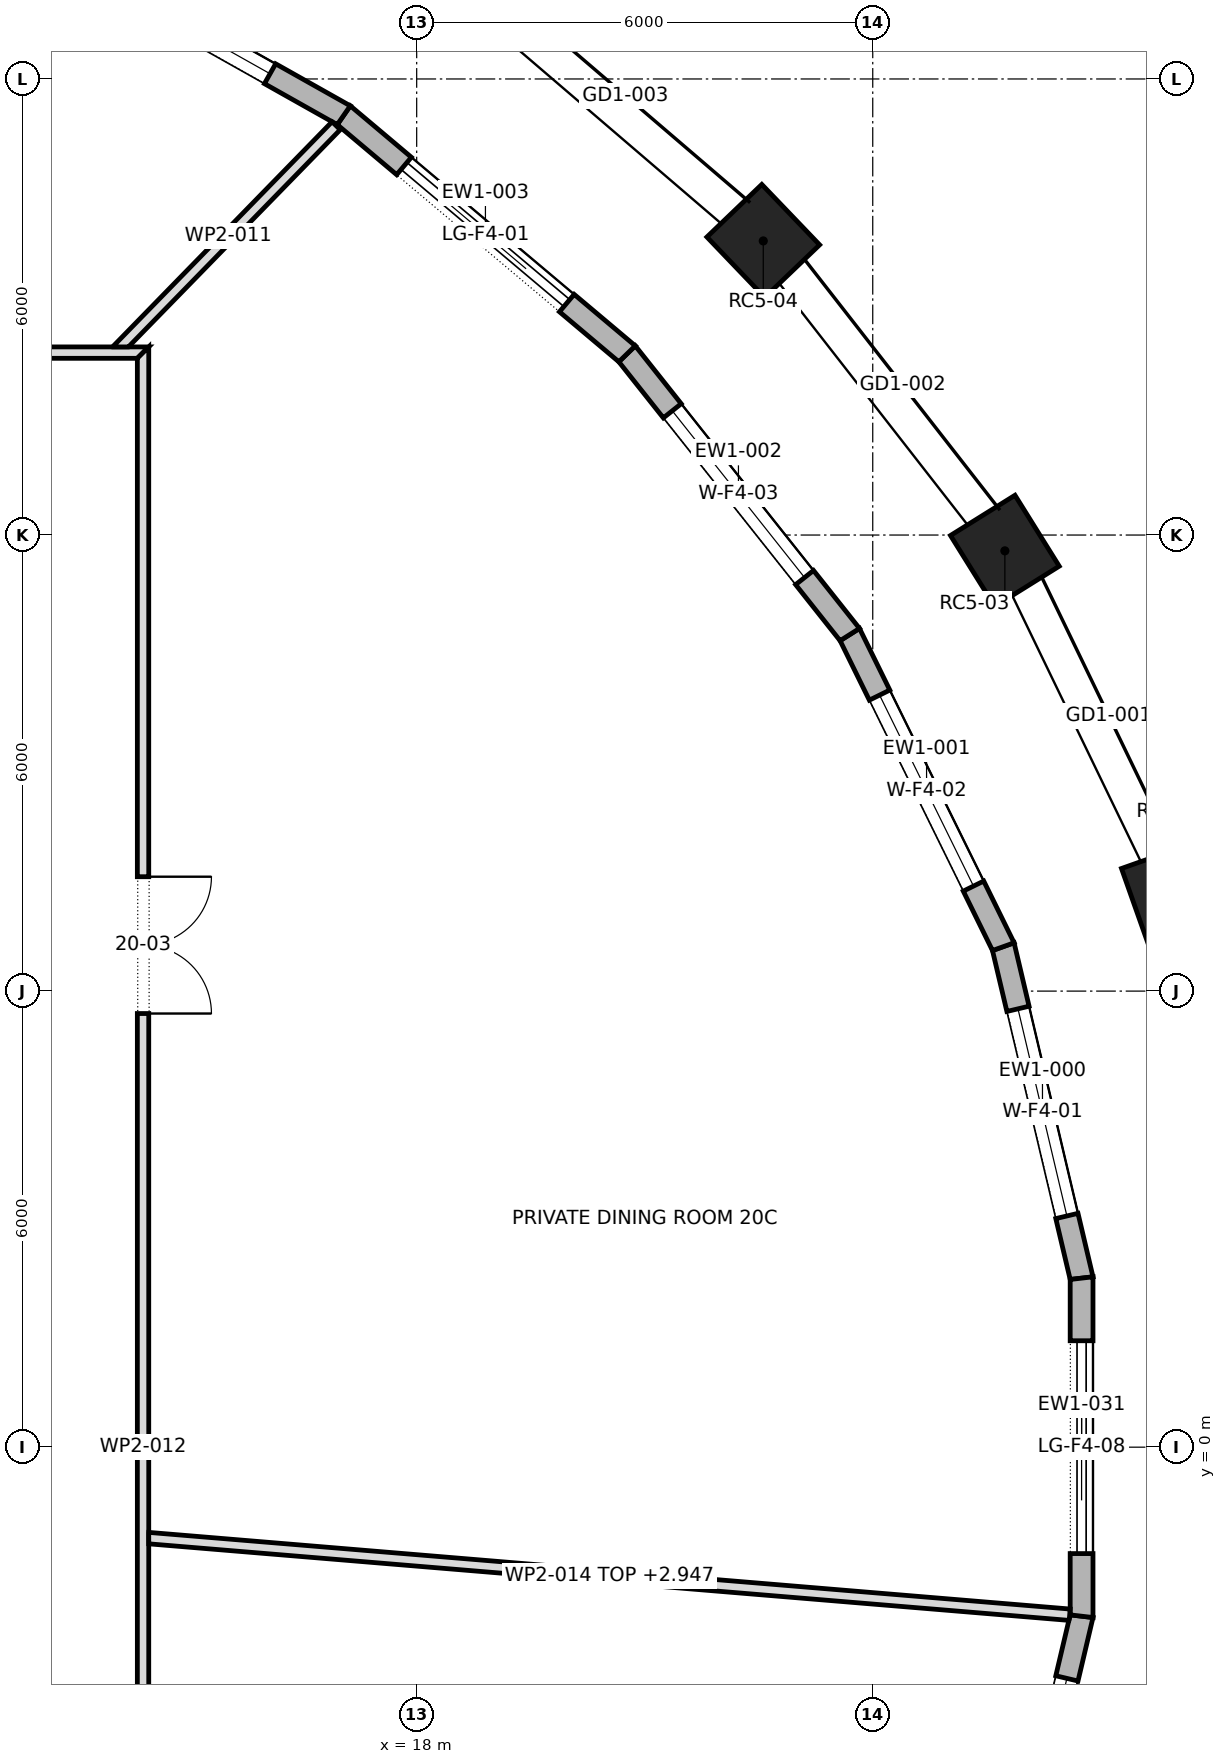
"""IFC4 building model, lengths in metres.
Left out: names, types, materials, properties, quantities, classifications, styles, units other than length and angle.
Written with IfcOpenShell. Run it as: python <this file> out.ifc"""

import sys

from ifc_helpers import new_model, si_unit, direction, frame, frame_2d, origin, origin_2d, place, context, subcontext, project, spatial, polyline, rectangle, outline, extrude, element, fill, save


model = new_model("IFC4")
c1 = context("Model", 3, precision=1e-05, world=origin(), true_north=direction((0.0, 1.0)))
c2 = subcontext(c1, "Body", "Model", "MODEL_VIEW")
j1 = project(units=[si_unit("LENGTHUNIT", "METRE"), si_unit("PLANEANGLEUNIT", "RADIAN")], contexts=[c1])
p1 = place(None, origin())
s1 = spatial("IfcSite", under=j1, at=p1, CompositionType="ELEMENT")
p2 = place(p1, origin())
s2 = spatial("IfcBuilding", under=s1, at=p2, CompositionType="ELEMENT")
p3 = place(p2, frame((0.0, 0.0, 288.3)))
s3 = spatial("IfcBuildingStorey", under=s2, at=p3, CompositionType="ELEMENT", Elevation=288.3)
for number, where, z_axis, x_axis in (
    (1, (27.927, 7.261, 0.0), (0.0, 0.0, 1.0), (-0.334, 0.943, 0.0)),
    (2, (25.738, 11.792, 0.0), (0.0, 0.0, 1.0), (-0.529, 0.849, 0.0)),
    (3, (22.56, 15.869, 0.0), (0.0, 0.0, 1.0), (-0.692, 0.722, 0.0)),
):
    element("IfcColumn", number, at=place(p3, frame(where, z_axis=z_axis, x_axis=x_axis)), inside=s3, PredefinedType="COLUMN", context=c2, shape_type="SweptSolid", body=[
        extrude(rectangle(XDim=1.1, YDim=1.0, at=origin_2d()), origin(), (0.0, 0.0, 1.0), 4.0),
    ])
p4 = place(p3, frame((26.748, 2.224, 0.0), z_axis=(0.0, 0.0, 1.0), x_axis=(-0.229862207503, 0.973223183839, 0.0)))
e4 = element("IfcWall", 4, at=p4, inside=s3, PredefinedType="STANDARD", context=c2, shape_type="SweptSolid", body=[
    extrude(outline(polyline([(-0.018, -0.15), (4.498, -0.15), (4.464, 0.15), (0.018, 0.15), (-0.018, -0.15)])), origin(), (0.0, 0.0, 1.0), 3.7),
])
p5 = place(p4, frame((0.841, 0.0, 0.6)))
e5 = element("IfcOpeningElement", 5, at=p5, cuts=e4, PredefinedType="OPENING", context=c2, shape_type="SweptSolid", body=[
    extrude(rectangle(XDim=2.8, YDim=2.65, at=frame_2d((1.4, 1.325))), frame((0.0, 0.162, 0.0), z_axis=(0.0, -1.0, 0.0), x_axis=(1.0, 0.0, 0.0)), (0.0, 0.0, 1.0), 0.324),
])
p6 = place(p3, frame((25.718, 6.585, 0.0), z_axis=(0.0, 0.0, 1.0), x_axis=(-0.441335149795, 0.897342345794, 0.0)))
e6 = element("IfcWall", 6, at=p6, inside=s3, PredefinedType="STANDARD", context=c2, shape_type="SweptSolid", body=[
    extrude(outline(polyline([(-0.017, -0.15), (4.592, -0.15), (4.56, 0.15), (0.017, 0.15), (-0.017, -0.15)])), origin(), (0.0, 0.0, 1.0), 3.7),
])
p7 = place(p6, frame((0.888, 0.0, 0.6)))
e7 = element("IfcOpeningElement", 7, at=p7, cuts=e6, PredefinedType="OPENING", context=c2, shape_type="SweptSolid", body=[
    extrude(rectangle(XDim=2.8, YDim=2.65, at=frame_2d((1.4, 1.325))), frame((0.0, 0.162, 0.0), z_axis=(0.0, -1.0, 0.0), x_axis=(1.0, 0.0, 0.0)), (0.0, 0.0, 1.0), 0.324),
])
p8 = place(p3, frame((23.698, 10.691, 0.0), z_axis=(0.0, 0.0, 1.0), x_axis=(-0.621544881236, 0.783378555112, 0.0)))
e8 = element("IfcWall", 8, at=p8, inside=s3, PredefinedType="STANDARD", context=c2, shape_type="SweptSolid", body=[
    extrude(outline(polyline([(-0.016, -0.15), (4.729, -0.15), (4.699, 0.15), (0.016, 0.15), (-0.016, -0.15)])), origin(), (0.0, 0.0, 1.0), 3.7),
])
p9 = place(p8, frame((0.957, 0.0, 0.6)))
e9 = element("IfcOpeningElement", 9, at=p9, cuts=e8, PredefinedType="OPENING", context=c2, shape_type="SweptSolid", body=[
    extrude(rectangle(XDim=2.8, YDim=2.65, at=frame_2d((1.4, 1.325))), frame((0.0, 0.162, 0.0), z_axis=(0.0, -1.0, 0.0), x_axis=(1.0, 0.0, 0.0)), (0.0, 0.0, 1.0), 0.324),
])
p10 = place(p3, frame((20.768, 14.384, 0.0), z_axis=(0.0, 0.0, 1.0), x_axis=(-0.764876116592, 0.644177402792, 0.0)))
e10 = element("IfcWall", 10, at=p10, inside=s3, PredefinedType="STANDARD", context=c2, shape_type="SweptSolid", body=[
    extrude(outline(polyline([(-0.015, -0.15), (4.887, -0.15), (4.859, 0.15), (0.015, 0.15), (-0.015, -0.15)])), origin(), (0.0, 0.0, 1.0), 3.7),
])
p11 = place(p10, frame((1.036, 0.0, 0.0)))
e11 = element("IfcOpeningElement", 11, at=p11, cuts=e10, PredefinedType="OPENING", context=c2, shape_type="SweptSolid", body=[
    extrude(rectangle(XDim=2.8, YDim=3.25, at=frame_2d((1.4, 1.625))), frame((0.0, 0.162, 0.0), z_axis=(0.0, -1.0, 0.0), x_axis=(1.0, 0.0, 0.0)), (0.0, 0.0, 1.0), 0.324),
])
p12 = place(p3, frame((17.041, 17.523, 0.0), z_axis=(0.0, 0.0, 1.0), x_axis=(-0.871488606878, 0.490415750239, 0.0)))
e12 = element("IfcWall", 12, at=p12, inside=s3, PredefinedType="STANDARD", context=c2, shape_type="SweptSolid", body=[
    extrude(outline(polyline([(-0.014, -0.15), (5.039, -0.15), (5.013, 0.15), (0.014, 0.15), (-0.014, -0.15)])), origin(), (0.0, 0.0, 1.0), 3.7),
])
p13 = place(p12, frame((1.113, 0.0, 0.6)))
e13 = element("IfcOpeningElement", 13, at=p13, cuts=e12, PredefinedType="OPENING", context=c2, shape_type="SweptSolid", body=[
    extrude(rectangle(XDim=2.8, YDim=2.65, at=frame_2d((1.4, 1.325))), frame((0.0, 0.162, 0.0), z_axis=(0.0, -1.0, 0.0), x_axis=(1.0, 0.0, 0.0)), (0.0, 0.0, 1.0), 0.324),
])
p14 = place(p3, frame((25.718, -6.585, 0.0), z_axis=(0.0, 0.0, 1.0), x_axis=(0.229862207503, 0.973223183839, 0.0)))
e14 = element("IfcWall", 14, at=p14, inside=s3, PredefinedType="STANDARD", context=c2, shape_type="SweptSolid", body=[
    extrude(outline(polyline([(-0.017, -0.15), (4.499, -0.15), (4.463, 0.15), (0.017, 0.15), (-0.017, -0.15)])), origin(), (0.0, 0.0, 1.0), 3.7),
])
p15 = place(p14, frame((0.841, 0.0, 0.6)))
e15 = element("IfcOpeningElement", 15, at=p15, cuts=e14, PredefinedType="OPENING", context=c2, shape_type="SweptSolid", body=[
    extrude(rectangle(XDim=2.8, YDim=2.65, at=frame_2d((1.4, 1.325))), frame((0.0, 0.162, 0.0), z_axis=(0.0, -1.0, 0.0), x_axis=(1.0, 0.0, 0.0)), (0.0, 0.0, 1.0), 0.324),
])
p16 = place(p3, frame((26.748, -2.224, 0.0), z_axis=(0.0, 0.0, 1.0), x_axis=(0.0, 1.0, 0.0)))
e16 = element("IfcWall", 16, at=p16, inside=s3, PredefinedType="STANDARD", context=c2, shape_type="SweptSolid", body=[
    extrude(outline(polyline([(-0.018, -0.15), (4.465, -0.15), (4.43, 0.15), (0.018, 0.15), (-0.018, -0.15)])), origin(), (0.0, 0.0, 1.0), 3.7),
])
p17 = place(p16, frame((0.824, 0.0, 0.0)))
e17 = element("IfcOpeningElement", 17, at=p17, cuts=e16, PredefinedType="OPENING", context=c2, shape_type="SweptSolid", body=[
    extrude(rectangle(XDim=2.8, YDim=3.25, at=frame_2d((1.4, 1.625))), frame((0.0, 0.162, 0.0), z_axis=(0.0, -1.0, 0.0), x_axis=(1.0, 0.0, 0.0)), (0.0, 0.0, 1.0), 0.324),
])
p18 = place(p3, frame((-14.475, 14.4, 0.0), z_axis=(0.0, 0.0, 1.0), x_axis=(1.0, 0.0, 0.0)))
e18 = element("IfcWall", 18, at=p18, inside=s3, PredefinedType="PARTITIONING", context=c2, shape_type="SweptSolid", body=[
    extrude(outline(polyline([(0.15, -0.075), (2.06, -0.075), (3.97, -0.075), (5.88, -0.075), (7.79, -0.075), (9.7, -0.075), (11.61, -0.075), (13.52, -0.075), (15.43, -0.075), (17.34, -0.075), (19.25, -0.075), (21.16, -0.075), (23.07, -0.075), (24.98, -0.075), (26.89, -0.075), (28.8, -0.075), (28.95, 0.075), (27.02, 0.075), (25.09, 0.075), (23.16, 0.075), (21.23, 0.075), (19.3, 0.075), (17.37, 0.075), (15.44, 0.075), (13.51, 0.075), (11.58, 0.075), (9.65, 0.075), (7.72, 0.075), (5.79, 0.075), (3.86, 0.075), (1.93, 0.075), (0.0, 0.075), (0.15, -0.075)])), origin(), (0.0, 0.0, 1.0), 3.7),
])
p19 = place(p18, frame((20.15, 0.0, 0.0)))
e19 = element("IfcOpeningElement", 19, at=p19, cuts=e18, PredefinedType="OPENING", context=c2, shape_type="SweptSolid", body=[
    extrude(rectangle(XDim=1.0, YDim=2.1, at=frame_2d((0.5, 1.05))), frame((0.0, 0.087, 0.0), z_axis=(0.0, -1.0, 0.0), x_axis=(1.0, 0.0, 0.0)), (0.0, 0.0, 1.0), 0.174),
])
p20 = place(p18, frame((8.565, 0.0, 0.0)))
e20 = element("IfcOpeningElement", 20, at=p20, cuts=e18, PredefinedType="OPENING", context=c2, shape_type="SweptSolid", body=[
    extrude(rectangle(XDim=1.0, YDim=2.1, at=frame_2d((0.5, 1.05))), frame((0.0, 0.087, 0.0), z_axis=(0.0, -1.0, 0.0), x_axis=(1.0, 0.0, 0.0)), (0.0, 0.0, 1.0), 0.174),
])
p21 = place(p18, frame((2.205, 0.0, 0.0)))
e21 = element("IfcOpeningElement", 21, at=p21, cuts=e18, PredefinedType="OPENING", context=c2, shape_type="SweptSolid", body=[
    extrude(rectangle(XDim=1.0, YDim=2.1, at=frame_2d((0.5, 1.05))), frame((0.0, 0.087, 0.0), z_axis=(0.0, -1.0, 0.0), x_axis=(1.0, 0.0, 0.0)), (0.0, 0.0, 1.0), 0.174),
])
p22 = place(p3, frame((14.052, 14.423, 0.0), z_axis=(0.0, 0.0, 1.0), x_axis=(0.698170464683, 0.715931562542, 0.0)))
e22 = element("IfcWall", 22, at=p22, inside=s3, PredefinedType="PARTITIONING", context=c2, shape_type="SweptSolid", body=[
    extrude(outline(polyline([(4.137, -0.075), (4.137, 0.075), (4.137, 0.075), (2.758, 0.075), (1.379, 0.075), (0.0, 0.075), (0.0, 0.075), (0.146, -0.075), (2.142, -0.075), (4.137, -0.075)])), origin(), (0.0, 0.0, 1.0), 3.7),
])
p23 = place(p3, frame((14.4, -14.475, 0.0), z_axis=(0.0, 0.0, 1.0), x_axis=(0.0, 1.0, 0.0)))
e23 = element("IfcWall", 23, at=p23, inside=s3, PredefinedType="PARTITIONING", context=c2, shape_type="SweptSolid", body=[
    extrude(outline(polyline([(0.0, -0.075), (1.93, -0.075), (3.86, -0.075), (5.79, -0.075), (7.72, -0.075), (9.65, -0.075), (11.58, -0.075), (13.51, -0.075), (15.44, -0.075), (17.37, -0.075), (19.3, -0.075), (21.23, -0.075), (23.16, -0.075), (25.09, -0.075), (27.02, -0.075), (28.95, -0.075), (28.8, 0.075), (26.89, 0.075), (24.98, 0.075), (23.07, 0.075), (21.16, 0.075), (19.25, 0.075), (17.34, 0.075), (15.43, 0.075), (13.52, 0.075), (11.61, 0.075), (9.7, 0.075), (7.79, 0.075), (5.88, 0.075), (3.97, 0.075), (2.06, 0.075), (0.15, 0.075), (0.0, -0.075)])), origin(), (0.0, 0.0, 1.0), 3.7),
])
p24 = place(p23, frame((3.535, 0.0, 0.0)))
e24 = element("IfcOpeningElement", 24, at=p24, cuts=e23, PredefinedType="OPENING", context=c2, shape_type="SweptSolid", body=[
    extrude(rectangle(XDim=1.0, YDim=2.1, at=frame_2d((0.5, 1.05))), frame((0.0, 0.087, 0.0), z_axis=(0.0, -1.0, 0.0), x_axis=(1.0, 0.0, 0.0)), (0.0, 0.0, 1.0), 0.174),
])
p25 = place(p23, frame((10.14, 0.0, 0.0)))
e25 = element("IfcOpeningElement", 25, at=p25, cuts=e23, PredefinedType="OPENING", context=c2, shape_type="SweptSolid", body=[
    extrude(rectangle(XDim=1.0, YDim=2.1, at=frame_2d((0.5, 1.05))), frame((0.0, 0.087, 0.0), z_axis=(0.0, -1.0, 0.0), x_axis=(1.0, 0.0, 0.0)), (0.0, 0.0, 1.0), 0.174),
])
p26 = place(p23, frame((20.18, 0.0, 0.0)))
e26 = element("IfcOpeningElement", 26, at=p26, cuts=e23, PredefinedType="OPENING", context=c2, shape_type="SweptSolid", body=[
    extrude(rectangle(XDim=1.8, YDim=2.1, at=frame_2d((0.9, 1.05))), frame((0.0, 0.087, 0.0), z_axis=(0.0, -1.0, 0.0), x_axis=(1.0, 0.0, 0.0)), (0.0, 0.0, 1.0), 0.174),
])
p27 = place(p3, frame((14.469, -1.196, 0.0), z_axis=(0.0, 0.0, 1.0), x_axis=(0.996556684965, -0.08291425481, 0.0)))
e27 = element("IfcWall", 27, at=p27, inside=s3, PredefinedType="PARTITIONING", context=c2, shape_type="SweptSolid", body=[
    extrude(outline(polyline([(0.012, -0.075), (1.747, -0.075), (3.483, -0.075), (5.218, -0.075), (6.953, -0.075), (8.689, -0.075), (10.424, -0.075), (12.159, -0.075), (12.164, -0.045), (12.164, 0.075), (10.426, 0.075), (8.688, 0.075), (6.951, 0.075), (5.213, 0.075), (3.475, 0.075), (1.738, 0.075), (0.0, 0.075), (0.0, 0.07), (0.012, -0.075)])), origin(), (0.0, 0.0, 1.0), 2.947),
])
p28 = place(p5, origin())
e28 = element("IfcWindow", 28, at=p28, inside=s3, PartitioningType="DOUBLE_PANEL_VERTICAL", PredefinedType="WINDOW", context=c2, shape_type="SweptSolid", body=[
    extrude(rectangle(XDim=2.8, YDim=2.65, at=frame_2d((1.4, 1.325))), frame((0.0, 0.03, 0.0), z_axis=(0.0, -1.0, 0.0), x_axis=(1.0, 0.0, 0.0)), (0.0, 0.0, 1.0), 0.06),
])
fill(e5, e28)
p29 = place(p7, origin())
e29 = element("IfcWindow", 29, at=p29, inside=s3, PartitioningType="DOUBLE_PANEL_VERTICAL", PredefinedType="WINDOW", context=c2, shape_type="SweptSolid", body=[
    extrude(rectangle(XDim=2.8, YDim=2.65, at=frame_2d((1.4, 1.325))), frame((0.0, 0.03, 0.0), z_axis=(0.0, -1.0, 0.0), x_axis=(1.0, 0.0, 0.0)), (0.0, 0.0, 1.0), 0.06),
])
fill(e7, e29)
p30 = place(p9, origin())
e30 = element("IfcWindow", 30, at=p30, inside=s3, PartitioningType="DOUBLE_PANEL_VERTICAL", PredefinedType="WINDOW", context=c2, shape_type="SweptSolid", body=[
    extrude(rectangle(XDim=2.8, YDim=2.65, at=frame_2d((1.4, 1.325))), frame((0.0, 0.03, 0.0), z_axis=(0.0, -1.0, 0.0), x_axis=(1.0, 0.0, 0.0)), (0.0, 0.0, 1.0), 0.06),
])
fill(e9, e30)
p31 = place(p11, origin())
e31 = element("IfcDoor", 31, at=p31, inside=s3, OperationType="DOUBLE_DOOR_SLIDING", PredefinedType="DOOR", context=c2, shape_type="SweptSolid", body=[
    extrude(rectangle(XDim=2.8, YDim=3.25, at=frame_2d((1.4, 1.625))), frame((0.0, 0.025, 0.0), z_axis=(0.0, -1.0, 0.0), x_axis=(1.0, 0.0, 0.0)), (0.0, 0.0, 1.0), 0.05),
])
fill(e11, e31)
p32 = place(p13, origin())
e32 = element("IfcWindow", 32, at=p32, inside=s3, PartitioningType="DOUBLE_PANEL_VERTICAL", PredefinedType="WINDOW", context=c2, shape_type="SweptSolid", body=[
    extrude(rectangle(XDim=2.8, YDim=2.65, at=frame_2d((1.4, 1.325))), frame((0.0, 0.03, 0.0), z_axis=(0.0, -1.0, 0.0), x_axis=(1.0, 0.0, 0.0)), (0.0, 0.0, 1.0), 0.06),
])
fill(e13, e32)
p33 = place(p15, origin())
e33 = element("IfcWindow", 33, at=p33, inside=s3, PartitioningType="DOUBLE_PANEL_VERTICAL", PredefinedType="WINDOW", context=c2, shape_type="SweptSolid", body=[
    extrude(rectangle(XDim=2.8, YDim=2.65, at=frame_2d((1.4, 1.325))), frame((0.0, 0.03, 0.0), z_axis=(0.0, -1.0, 0.0), x_axis=(1.0, 0.0, 0.0)), (0.0, 0.0, 1.0), 0.06),
])
fill(e15, e33)
p34 = place(p17, origin())
e34 = element("IfcDoor", 34, at=p34, inside=s3, OperationType="DOUBLE_DOOR_SLIDING", PredefinedType="DOOR", context=c2, shape_type="SweptSolid", body=[
    extrude(rectangle(XDim=2.8, YDim=3.25, at=frame_2d((1.4, 1.625))), frame((0.0, 0.025, 0.0), z_axis=(0.0, -1.0, 0.0), x_axis=(1.0, 0.0, 0.0)), (0.0, 0.0, 1.0), 0.05),
])
fill(e17, e34)
p35 = place(p26, frame((1.8, 0.0, 0.0), z_axis=(0.0, 0.0, 1.0), x_axis=(-1.0, 0.0, 0.0)))
e35 = element("IfcDoor", 35, at=p35, inside=s3, OperationType="DOUBLE_DOOR_SINGLE_SWING", PredefinedType="DOOR", context=c2, shape_type="SweptSolid", body=[
    extrude(rectangle(XDim=1.8, YDim=2.1, at=frame_2d((0.9, 1.05))), frame((0.0, 0.025, 0.0), z_axis=(0.0, -1.0, 0.0), x_axis=(1.0, 0.0, 0.0)), (0.0, 0.0, 1.0), 0.05),
])
fill(e26, e35)
save(model, sys.argv[1])
